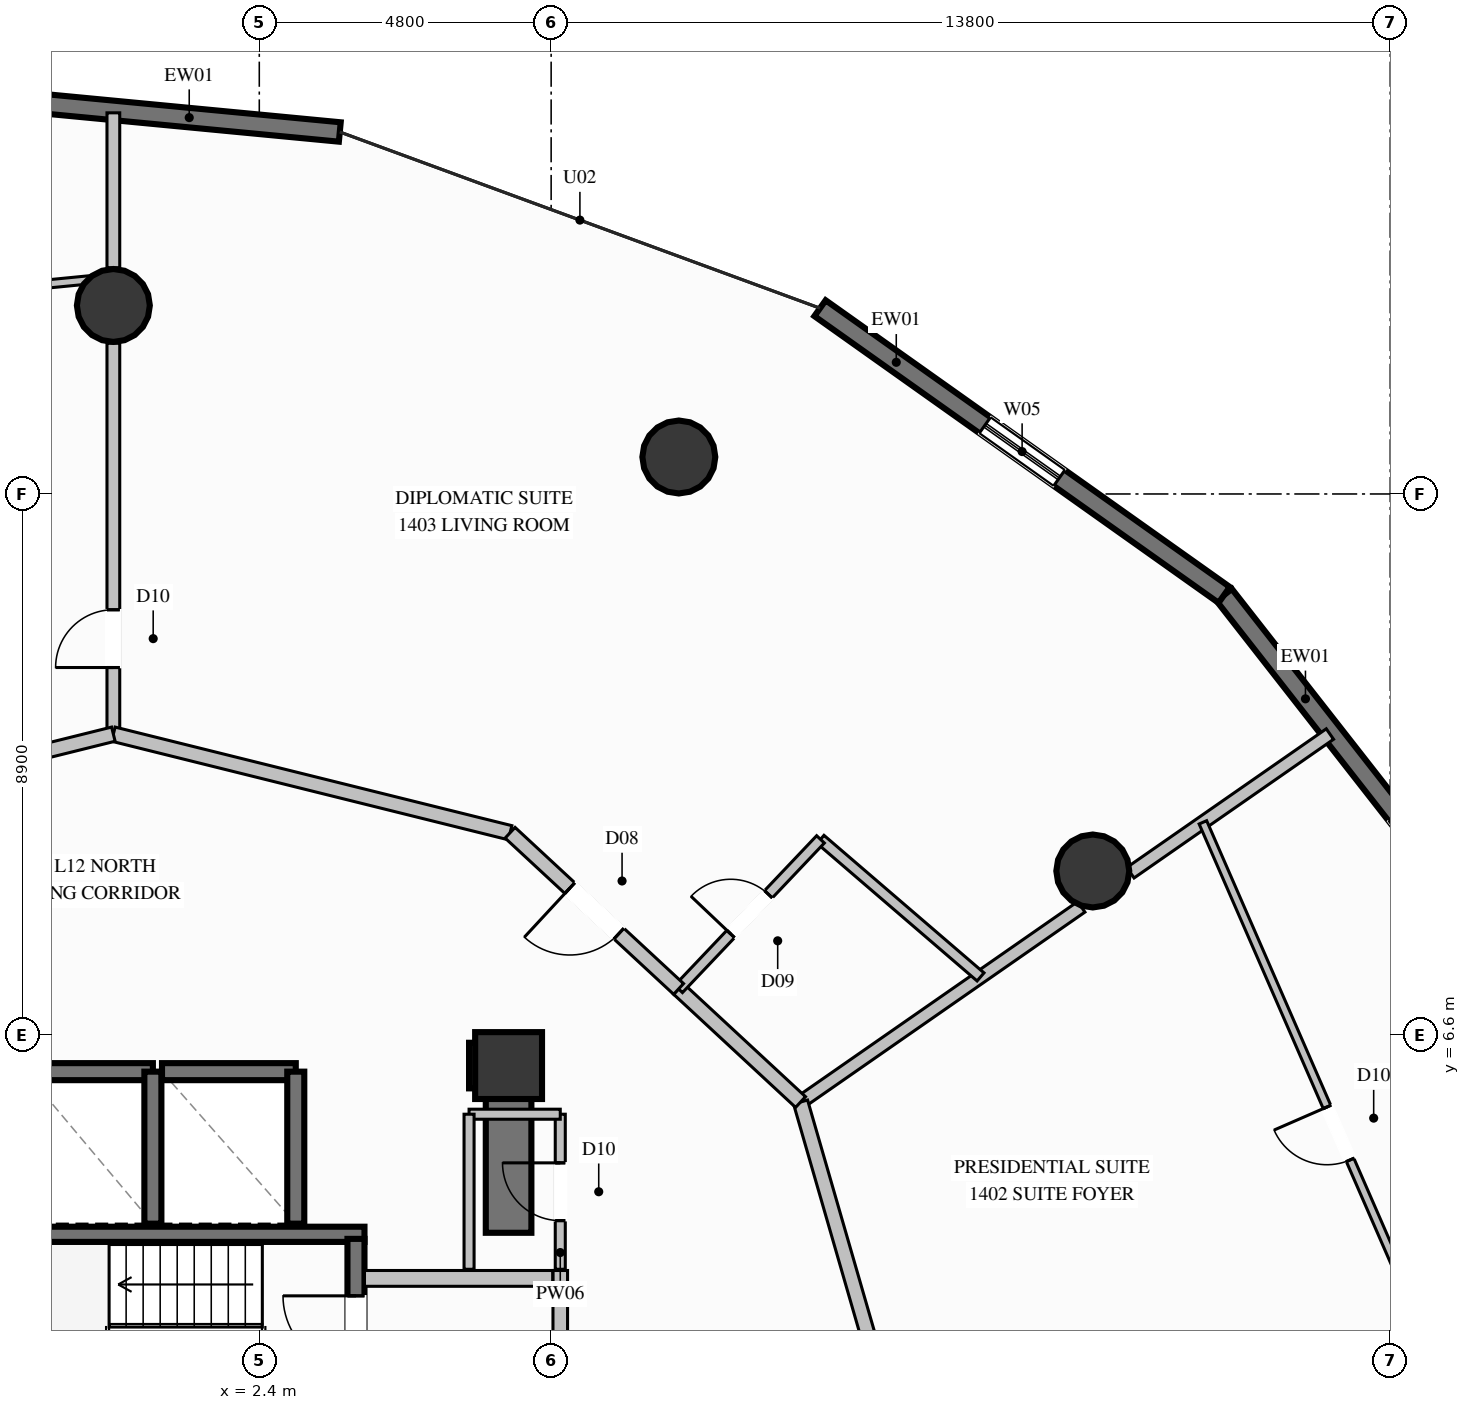
"""IFC4 building model, lengths in metres.
Left out: names, types, materials, properties, quantities, classifications, styles, units other than length and angle.
Written with IfcOpenShell. Run it as: python <this file> out.ifc"""

import sys

from ifc_helpers import new_model, si_unit, direction, frame, frame_2d, origin, origin_2d, place, context, subcontext, project, spatial, rectangle, circle, extrude, element, fill, save


model = new_model("IFC4")
c1 = context("Model", 3, precision=1e-05, world=origin(), true_north=direction((0.0, 1.0)))
c2 = subcontext(c1, "Body", "Model", "MODEL_VIEW")
j1 = project(units=[si_unit("LENGTHUNIT", "METRE"), si_unit("PLANEANGLEUNIT", "RADIAN")], contexts=[c1])
p1 = place(None, origin())
s1 = spatial("IfcSite", under=j1, at=p1, CompositionType="ELEMENT")
p2 = place(p1, origin())
s2 = spatial("IfcBuilding", under=s1, at=p2, CompositionType="ELEMENT")
p3 = place(p2, frame((0.0, 0.0, 53.6)))
s3 = spatial("IfcBuildingStorey", under=s2, at=p3, CompositionType="ELEMENT", Elevation=53.6)
p4 = place(p3, frame((6.5, 6.1, 0.0), z_axis=(0.0, 0.0, 1.0), x_axis=(1.0, 0.0, 0.0)))
e1 = element("IfcColumn", 1, at=p4, inside=s3, PredefinedType="COLUMN", context=c2, shape_type="SweptSolid", body=[
    extrude(rectangle(XDim=1.1, YDim=1.1, at=origin_2d()), origin(), (0.0, 0.0, 1.0), 3.6),
])
p5 = place(p3, frame((-4.13, 3.325, 0.0), z_axis=(0.0, 0.0, 1.0), x_axis=(1.0, 0.0, 0.0)))
e2 = element("IfcWall", 2, at=p5, inside=s3, PredefinedType="SOLIDWALL", context=c2, shape_type="SweptSolid", body=[
    extrude(rectangle(XDim=8.26, YDim=0.25, at=frame_2d((4.13, 0.0))), origin(), (0.0, 0.0, 1.0), 3.6),
])
p6 = place(p3, frame((5.85, 6.1, 0.0), z_axis=(0.0, 0.0, 1.0), x_axis=(1.0, 0.0, 0.0)))
e3 = element("IfcWall", 3, at=p6, inside=s3, PredefinedType="SHEAR", context=c2, shape_type="SweptSolid", body=[
    extrude(rectangle(XDim=0.275, YDim=0.75, at=frame_2d((0.137, 0.0))), origin(), (0.0, 0.0, 1.0), 3.6),
])
p7 = place(p3, frame((6.5, 3.35, 0.0), z_axis=(0.0, 0.0, 1.0), x_axis=(0.0, 1.0, 0.0)))
e4 = element("IfcWall", 4, at=p7, inside=s3, PredefinedType="SHEAR", context=c2, shape_type="SweptSolid", body=[
    extrude(rectangle(XDim=3.125, YDim=0.75, at=frame_2d((1.562, 0.0))), origin(), (0.0, 0.0, 1.0), 3.6),
])
for number, where, z_axis, x_axis in (
    (5, (16.108, 9.3, 0.0), (0.0, 0.0, 1.0), (1.0, 0.0, 0.0)),
    (6, (9.3, 16.108, 0.0), (0.0, 0.0, 1.0), (1.0, 0.0, 0.0)),
    (7, (0.0, 18.6, 0.0), (0.0, 0.0, 1.0), (1.0, 0.0, 0.0)),
):
    element("IfcColumn", number, at=place(p3, frame(where, z_axis=z_axis, x_axis=x_axis)), inside=s3, PredefinedType="COLUMN", context=c2, shape_type="SweptSolid", body=[
        extrude(circle(Radius=0.6, at=origin_2d()), origin(), (0.0, 0.0, 1.0), 3.6),
    ])
p8 = place(p3, frame((18.269, 13.84, 0.0), z_axis=(0.0, 0.0, 1.0), x_axis=(0.616094649126, -0.787672129327, 0.0)))
e8 = element("IfcWall", 8, at=p8, inside=s3, PredefinedType="SOLIDWALL", context=c2, shape_type="SweptSolid", body=[
    extrude(rectangle(XDim=7.705, YDim=0.32, at=frame_2d((3.853, 0.0))), origin(), (0.0, 0.0, 1.0), 3.34),
])
p9 = place(p8, frame((4.589, 0.0, 0.85)))
e9 = element("IfcOpeningElement", 9, at=p9, cuts=e8, PredefinedType="OPENING", context=c2, shape_type="SweptSolid", body=[
    extrude(rectangle(XDim=1.5, YDim=1.2, at=frame_2d((0.75, 0.6))), frame((0.0, 0.17, 0.0), z_axis=(0.0, -1.0, 0.0), x_axis=(1.0, 0.0, 0.0)), (0.0, 0.0, 1.0), 0.34),
])
p10 = place(p3, frame((11.622, 18.555, 0.0), z_axis=(0.0, 0.0, 1.0), x_axis=(0.815643955579, -0.578554178731, 0.0)))
e10 = element("IfcWall", 10, at=p10, inside=s3, PredefinedType="SOLIDWALL", context=c2, shape_type="SweptSolid", body=[
    extrude(rectangle(XDim=8.149, YDim=0.32, at=frame_2d((4.075, 0.0))), origin(), (0.0, 0.0, 1.0), 3.34),
])
p11 = place(p10, frame((3.325, 0.0, 0.85)))
e11 = element("IfcOpeningElement", 11, at=p11, cuts=e10, PredefinedType="OPENING", context=c2, shape_type="SweptSolid", body=[
    extrude(rectangle(XDim=1.5, YDim=1.2, at=frame_2d((0.75, 0.6))), frame((0.0, 0.17, 0.0), z_axis=(0.0, -1.0, 0.0), x_axis=(1.0, 0.0, 0.0)), (0.0, 0.0, 1.0), 0.34),
])
p12 = place(p3, frame((-4.651, 22.252, 0.0), z_axis=(0.0, 0.0, 1.0), x_axis=(0.995479154881, -0.094980272677, 0.0)))
e12 = element("IfcWall", 12, at=p12, inside=s3, PredefinedType="SOLIDWALL", context=c2, shape_type="SweptSolid", body=[
    extrude(rectangle(XDim=8.413, YDim=0.32, at=frame_2d((4.207, 0.0))), origin(), (0.0, 0.0, 1.0), 3.34),
])
p13 = place(p12, frame((1.388, 0.0, 0.35)))
e13 = element("IfcOpeningElement", 13, at=p13, cuts=e12, PredefinedType="OPENING", context=c2, shape_type="SweptSolid", body=[
    extrude(rectangle(XDim=1.8, YDim=2.6, at=frame_2d((0.9, 1.3))), frame((0.0, 0.17, 0.0), z_axis=(0.0, -1.0, 0.0), x_axis=(1.0, 0.0, 0.0)), (0.0, 0.0, 1.0), 0.34),
])
p14 = place(p3, frame((0.65, 6.0, 0.0), z_axis=(0.0, 0.0, 1.0), x_axis=(-1.0, 0.0, 0.0)))
e14 = element("IfcWall", 14, at=p14, inside=s3, PredefinedType="SOLIDWALL", context=c2, shape_type="SweptSolid", body=[
    extrude(rectangle(XDim=2.1, YDim=0.28, at=frame_2d((1.05, 0.0))), origin(), (0.0, 0.0, 1.0), 3.34),
])
p15 = place(p3, frame((0.65, 3.5, 0.0), z_axis=(0.0, 0.0, 1.0), x_axis=(0.0, 1.0, 0.0)))
e15 = element("IfcWall", 15, at=p15, inside=s3, PredefinedType="SOLIDWALL", context=c2, shape_type="SweptSolid", body=[
    extrude(rectangle(XDim=2.5, YDim=0.28, at=frame_2d((1.25, 0.0))), origin(), (0.0, 0.0, 1.0), 3.34),
])
p16 = place(p3, frame((3.0, 6.0, 0.0), z_axis=(0.0, 0.0, 1.0), x_axis=(-1.0, 0.0, 0.0)))
e16 = element("IfcWall", 16, at=p16, inside=s3, PredefinedType="SOLIDWALL", context=c2, shape_type="SweptSolid", body=[
    extrude(rectangle(XDim=2.2, YDim=0.28, at=frame_2d((1.1, 0.0))), origin(), (0.0, 0.0, 1.0), 3.34),
])
p17 = place(p3, frame((3.0, 3.5, 0.0), z_axis=(0.0, 0.0, 1.0), x_axis=(0.0, 1.0, 0.0)))
e17 = element("IfcWall", 17, at=p17, inside=s3, PredefinedType="SOLIDWALL", context=c2, shape_type="SweptSolid", body=[
    extrude(rectangle(XDim=2.5, YDim=0.28, at=frame_2d((1.25, 0.0))), origin(), (0.0, 0.0, 1.0), 3.34),
])
p18 = place(p3, frame((3.99, -2.21, 0.0), z_axis=(0.0, 0.0, 1.0), x_axis=(0.0, 1.0, 0.0)))
e18 = element("IfcWall", 18, at=p18, inside=s3, PredefinedType="SOLIDWALL", context=c2, shape_type="SweptSolid", body=[
    extrude(rectangle(XDim=5.46, YDim=0.28, at=frame_2d((2.73, 0.0))), origin(), (0.0, 0.0, 1.0), 3.34),
])
p19 = place(p18, frame((3.323, 0.0, 0.0)))
e19 = element("IfcOpeningElement", 19, at=p19, cuts=e18, PredefinedType="OPENING", context=c2, shape_type="SweptSolid", body=[
    extrude(rectangle(XDim=1.2, YDim=2.2, at=frame_2d((0.6, 1.1))), frame((0.0, 0.15, 0.0), z_axis=(0.0, -1.0, 0.0), x_axis=(1.0, 0.0, 0.0)), (0.0, 0.0, 1.0), 0.3),
])
p20 = place(p3, frame((7.35, -2.34, 0.0), z_axis=(0.0, 0.0, 1.0), x_axis=(0.0, 1.0, 0.0)))
e20 = element("IfcWall", 20, at=p20, inside=s3, PredefinedType="PARTITIONING", context=c2, shape_type="SweptSolid", body=[
    extrude(rectangle(XDim=5.07, YDim=0.24, at=frame_2d((2.535, 0.0))), origin(), (0.0, 0.0, 1.0), 2.425),
])
p21 = place(p20, frame((2.548, 0.0, 0.0)))
e21 = element("IfcOpeningElement", 21, at=p21, cuts=e20, PredefinedType="OPENING", context=c2, shape_type="SweptSolid", body=[
    extrude(rectangle(XDim=1.15, YDim=2.2, at=frame_2d((0.575, 1.1))), frame((0.0, 0.13, 0.0), z_axis=(0.0, -1.0, 0.0), x_axis=(1.0, 0.0, 0.0)), (0.0, 0.0, 1.0), 0.26),
])
p22 = place(p3, frame((4.13, 2.6, 0.0), z_axis=(0.0, 0.0, 1.0), x_axis=(1.0, 0.0, 0.0)))
e22 = element("IfcWall", 22, at=p22, inside=s3, PredefinedType="PARTITIONING", context=c2, shape_type="SweptSolid", body=[
    extrude(rectangle(XDim=3.095, YDim=0.26, at=frame_2d((1.548, 0.0))), origin(), (0.0, 0.0, 1.0), 3.34),
])
p23 = place(p3, frame((7.35, 2.75, 0.0), z_axis=(0.0, 0.0, 1.0), x_axis=(0.0, 1.0, 0.0)))
e23 = element("IfcWall", 23, at=p23, inside=s3, PredefinedType="PARTITIONING", context=c2, shape_type="SweptSolid", body=[
    extrude(rectangle(XDim=2.55, YDim=0.165, at=frame_2d((1.275, 0.0))), origin(), (0.0, 0.0, 1.0), 3.34),
])
p24 = place(p23, frame((0.8, 0.0, 0.0)))
e24 = element("IfcOpeningElement", 24, at=p24, cuts=e23, PredefinedType="OPENING", context=c2, shape_type="SweptSolid", body=[
    extrude(rectangle(XDim=0.95, YDim=2.1, at=frame_2d((0.475, 1.05))), frame((0.0, 0.093, 0.0), z_axis=(0.0, -1.0, 0.0), x_axis=(1.0, 0.0, 0.0)), (0.0, 0.0, 1.0), 0.185),
])
p25 = place(p3, frame((7.35, 5.3, 0.0), z_axis=(0.0, 0.0, 1.0), x_axis=(-1.0, 0.0, 0.0)))
e25 = element("IfcWall", 25, at=p25, inside=s3, PredefinedType="PARTITIONING", context=c2, shape_type="SweptSolid", body=[
    extrude(rectangle(XDim=1.5, YDim=0.165, at=frame_2d((0.75, 0.0))), origin(), (0.0, 0.0, 1.0), 2.425),
])
p26 = place(p3, frame((5.85, 5.3, 0.0), z_axis=(0.0, 0.0, 1.0), x_axis=(0.0, -1.0, 0.0)))
e26 = element("IfcWall", 26, at=p26, inside=s3, PredefinedType="PARTITIONING", context=c2, shape_type="SweptSolid", body=[
    extrude(rectangle(XDim=2.55, YDim=0.165, at=frame_2d((1.275, 0.0))), origin(), (0.0, 0.0, 1.0), 2.425),
])
p27 = place(p3, frame((11.302, 5.5, 0.0), z_axis=(0.0, 0.0, 1.0), x_axis=(0.821057380735, 0.570845668759, 0.0)))
e27 = element("IfcWall", 27, at=p27, inside=s3, PredefinedType="PARTITIONING", context=c2, shape_type="SweptSolid", body=[
    extrude(rectangle(XDim=5.623, YDim=0.21, at=frame_2d((2.812, 0.0))), origin(), (0.0, 0.0, 1.0), 2.709),
])
p28 = place(p3, frame((16.727, 9.271, 0.0), z_axis=(0.0, 0.0, 1.0), x_axis=(0.821073278348, 0.570822802262, 0.0)))
e28 = element("IfcWall", 28, at=p28, inside=s3, PredefinedType="PARTITIONING", context=c2, shape_type="SweptSolid", body=[
    extrude(rectangle(XDim=3.996, YDim=0.21, at=frame_2d((1.998, 0.0))), origin(), (0.0, 0.0, 1.0), 3.34),
])
p29 = place(p3, frame((0.0, 11.55, 0.0), z_axis=(0.0, 0.0, 1.0), x_axis=(0.0, 1.0, 0.0)))
e29 = element("IfcWall", 29, at=p29, inside=s3, PredefinedType="PARTITIONING", context=c2, shape_type="SweptSolid", body=[
    extrude(rectangle(XDim=6.43, YDim=0.21, at=frame_2d((3.215, 0.0))), origin(), (0.0, 0.0, 1.0), 2.709),
])
p30 = place(p29, frame((1.096, 0.0, 0.0)))
e30 = element("IfcOpeningElement", 30, at=p30, cuts=e29, PredefinedType="OPENING", context=c2, shape_type="SweptSolid", body=[
    extrude(rectangle(XDim=0.95, YDim=2.1, at=frame_2d((0.475, 1.05))), frame((0.0, 0.115, 0.0), z_axis=(0.0, -1.0, 0.0), x_axis=(1.0, 0.0, 0.0)), (0.0, 0.0, 1.0), 0.23),
])
p31 = place(p3, frame((0.0, 19.22, 0.0), z_axis=(0.0, 0.0, 1.0), x_axis=(0.0, 1.0, 0.0)))
e31 = element("IfcWall", 31, at=p31, inside=s3, PredefinedType="PARTITIONING", context=c2, shape_type="SweptSolid", body=[
    extrude(rectangle(XDim=2.548, YDim=0.21, at=frame_2d((1.274, 0.0))), origin(), (0.0, 0.0, 1.0), 3.34),
])
p32 = place(p3, frame((13.05, -0.55, 0.0), z_axis=(0.0, 0.0, 1.0), x_axis=(-0.27757702443, 0.960703385811, 0.0)))
e32 = element("IfcWall", 32, at=p32, inside=s3, PredefinedType="PARTITIONING", context=c2, shape_type="SweptSolid", body=[
    extrude(rectangle(XDim=6.298, YDim=0.24, at=frame_2d((3.149, 0.0))), origin(), (0.0, 0.0, 1.0), 3.34),
])
p33 = place(p3, frame((22.381, -0.132, 0.0), z_axis=(0.0, 0.0, 1.0), x_axis=(-0.399734330655, 0.916631040766, 0.0)))
e33 = element("IfcWall", 33, at=p33, inside=s3, PredefinedType="PARTITIONING", context=c2, shape_type="SweptSolid", body=[
    extrude(rectangle(XDim=11.163, YDim=0.135, at=frame_2d((5.582, 0.0))), origin(), (0.0, 0.0, 1.0), 3.34),
])
p34 = place(p33, frame((5.106, 0.0, 0.0)))
e34 = element("IfcOpeningElement", 34, at=p34, cuts=e33, PredefinedType="OPENING", context=c2, shape_type="SweptSolid", body=[
    extrude(rectangle(XDim=0.95, YDim=2.1, at=frame_2d((0.475, 1.05))), frame((0.0, 0.078, 0.0), z_axis=(0.0, -1.0, 0.0), x_axis=(1.0, 0.0, 0.0)), (0.0, 0.0, 1.0), 0.155),
])
p35 = place(p3, frame((11.302, 5.5, 0.0), z_axis=(0.0, 0.0, 1.0), x_axis=(-0.73328595385, 0.679920370254, 0.0)))
e35 = element("IfcWall", 35, at=p35, inside=s3, PredefinedType="PARTITIONING", context=c2, shape_type="SweptSolid", body=[
    extrude(rectangle(XDim=2.736, YDim=0.24, at=frame_2d((1.368, 0.0))), origin(), (0.0, 0.0, 1.0), 3.34),
])
p36 = place(p3, frame((14.262, 7.558, 0.0), z_axis=(0.0, 0.0, 1.0), x_axis=(-0.758416766399, 0.651769904525, 0.0)))
e36 = element("IfcWall", 36, at=p36, inside=s3, PredefinedType="PLUMBINGWALL", context=c2, shape_type="SweptSolid", body=[
    extrude(rectangle(XDim=3.47, YDim=0.175, at=frame_2d((1.735, 0.0))), origin(), (0.0, 0.0, 1.0), 3.34),
])
p37 = place(p3, frame((9.296, 7.36, 0.0), z_axis=(0.0, 0.0, 1.0), x_axis=(0.688287635692, 0.725437888832, 0.0)))
e37 = element("IfcWall", 37, at=p37, inside=s3, PredefinedType="PLUMBINGWALL", context=c2, shape_type="SweptSolid", body=[
    extrude(rectangle(XDim=3.391, YDim=0.175, at=frame_2d((1.696, 0.0))), origin(), (0.0, 0.0, 1.0), 2.709),
])
p38 = place(p37, frame((1.246, 0.0, 0.0)))
e38 = element("IfcOpeningElement", 38, at=p38, cuts=e37, PredefinedType="OPENING", context=c2, shape_type="SweptSolid", body=[
    extrude(rectangle(XDim=0.9, YDim=2.1, at=frame_2d((0.45, 1.05))), frame((0.0, 0.098, 0.0), z_axis=(0.0, -1.0, 0.0), x_axis=(1.0, 0.0, 0.0)), (0.0, 0.0, 1.0), 0.195),
])
p39 = place(p3, frame((6.525, 9.929, 0.0), z_axis=(0.0, 0.0, 1.0), x_axis=(-0.970496047219, 0.241117030365, 0.0)))
e39 = element("IfcWall", 39, at=p39, inside=s3, PredefinedType="PARTITIONING", context=c2, shape_type="SweptSolid", body=[
    extrude(rectangle(XDim=6.723, YDim=0.24, at=frame_2d((3.362, 0.0))), origin(), (0.0, 0.0, 1.0), 3.34),
])
p40 = place(p3, frame((9.296, 7.36, 0.0), z_axis=(0.0, 0.0, 1.0), x_axis=(-0.733350151535, 0.679851127265, 0.0)))
e40 = element("IfcWall", 40, at=p40, inside=s3, PredefinedType="PARTITIONING", context=c2, shape_type="SweptSolid", body=[
    extrude(rectangle(XDim=3.779, YDim=0.24, at=frame_2d((1.889, 0.0))), origin(), (0.0, 0.0, 1.0), 3.34),
])
p41 = place(p40, frame((1.339, 0.0, 0.0)))
e41 = element("IfcOpeningElement", 41, at=p41, cuts=e40, PredefinedType="OPENING", context=c2, shape_type="SweptSolid", body=[
    extrude(rectangle(XDim=1.1, YDim=2.3, at=frame_2d((0.55, 1.15))), frame((0.0, 0.13, 0.0), z_axis=(0.0, -1.0, 0.0), x_axis=(1.0, 0.0, 0.0)), (0.0, 0.0, 1.0), 0.26),
])
p42 = place(p3, frame((0.0, 11.55, 0.0), z_axis=(0.0, 0.0, 1.0), x_axis=(-0.970496047219, -0.241117030365, 0.0)))
e42 = element("IfcWall", 42, at=p42, inside=s3, PredefinedType="PARTITIONING", context=c2, shape_type="SweptSolid", body=[
    extrude(rectangle(XDim=6.723, YDim=0.24, at=frame_2d((3.362, 0.0))), origin(), (0.0, 0.0, 1.0), 3.34),
])
p43 = place(p3, frame((0.0, 19.06, 0.0), z_axis=(0.0, 0.0, 1.0), x_axis=(-0.995224645092, -0.097610992218, 0.0)))
e43 = element("IfcWall", 43, at=p43, inside=s3, PredefinedType="PARTITIONING", context=c2, shape_type="SweptSolid", body=[
    extrude(rectangle(XDim=10.665, YDim=0.135, at=frame_2d((5.333, 0.0))), origin(), (0.0, 0.0, 1.0), 2.792),
])
p44 = place(p43, frame((4.857, 0.0, 0.0)))
e44 = element("IfcOpeningElement", 44, at=p44, cuts=e43, PredefinedType="OPENING", context=c2, shape_type="SweptSolid", body=[
    extrude(rectangle(XDim=0.95, YDim=2.1, at=frame_2d((0.475, 1.05))), frame((0.0, 0.078, 0.0), z_axis=(0.0, -1.0, 0.0), x_axis=(1.0, 0.0, 0.0)), (0.0, 0.0, 1.0), 0.155),
])
p45 = place(p11, origin())
e45 = element("IfcWindow", 45, at=p45, inside=s3, PartitioningType="SINGLE_PANEL", PredefinedType="WINDOW", context=c2, shape_type="SweptSolid", body=[
    extrude(rectangle(XDim=1.5, YDim=1.2, at=frame_2d((0.75, 0.6))), frame((0.0, 0.03, 0.0), z_axis=(0.0, -1.0, 0.0), x_axis=(1.0, 0.0, 0.0)), (0.0, 0.0, 1.0), 0.06),
])
fill(e11, e45)
p46 = place(p19, origin())
e46 = element("IfcDoor", 46, at=p46, inside=s3, OperationType="SINGLE_SWING_RIGHT", PredefinedType="DOOR", context=c2, shape_type="SweptSolid", body=[
    extrude(rectangle(XDim=1.2, YDim=2.2, at=frame_2d((0.6, 1.1))), frame((0.0, 0.025, 0.0), z_axis=(0.0, -1.0, 0.0), x_axis=(1.0, 0.0, 0.0)), (0.0, 0.0, 1.0), 0.05),
])
fill(e19, e46)
p47 = place(p24, origin())
e47 = element("IfcDoor", 47, at=p47, inside=s3, OperationType="SINGLE_SWING_RIGHT", PredefinedType="DOOR", context=c2, shape_type="SweptSolid", body=[
    extrude(rectangle(XDim=0.95, YDim=2.1, at=frame_2d((0.475, 1.05))), frame((0.0, 0.025, 0.0), z_axis=(0.0, -1.0, 0.0), x_axis=(1.0, 0.0, 0.0)), (0.0, 0.0, 1.0), 0.05),
])
fill(e24, e47)
p48 = place(p34, origin())
e48 = element("IfcDoor", 48, at=p48, inside=s3, OperationType="SINGLE_SWING_RIGHT", PredefinedType="DOOR", context=c2, shape_type="SweptSolid", body=[
    extrude(rectangle(XDim=0.95, YDim=2.1, at=frame_2d((0.475, 1.05))), frame((0.0, 0.025, 0.0), z_axis=(0.0, -1.0, 0.0), x_axis=(1.0, 0.0, 0.0)), (0.0, 0.0, 1.0), 0.05),
])
fill(e34, e48)
p49 = place(p38, origin())
e49 = element("IfcDoor", 49, at=p49, inside=s3, OperationType="SINGLE_SWING_LEFT", PredefinedType="DOOR", context=c2, shape_type="SweptSolid", body=[
    extrude(rectangle(XDim=0.9, YDim=2.1, at=frame_2d((0.45, 1.05))), frame((0.0, 0.025, 0.0), z_axis=(0.0, -1.0, 0.0), x_axis=(1.0, 0.0, 0.0)), (0.0, 0.0, 1.0), 0.05),
])
fill(e38, e49)
p50 = place(p41, origin())
e50 = element("IfcDoor", 50, at=p50, inside=s3, OperationType="SINGLE_SWING_RIGHT", PredefinedType="DOOR", context=c2, shape_type="SweptSolid", body=[
    extrude(rectangle(XDim=1.1, YDim=2.3, at=frame_2d((0.55, 1.15))), frame((0.0, 0.025, 0.0), z_axis=(0.0, -1.0, 0.0), x_axis=(1.0, 0.0, 0.0)), (0.0, 0.0, 1.0), 0.05),
])
fill(e41, e50)
p51 = place(p30, origin())
e51 = element("IfcDoor", 51, at=p51, inside=s3, OperationType="SINGLE_SWING_LEFT", PredefinedType="DOOR", context=c2, shape_type="SweptSolid", body=[
    extrude(rectangle(XDim=0.95, YDim=2.1, at=frame_2d((0.475, 1.05))), frame((0.0, 0.025, 0.0), z_axis=(0.0, -1.0, 0.0), x_axis=(1.0, 0.0, 0.0)), (0.0, 0.0, 1.0), 0.05),
])
fill(e30, e51)
save(model, sys.argv[1])
